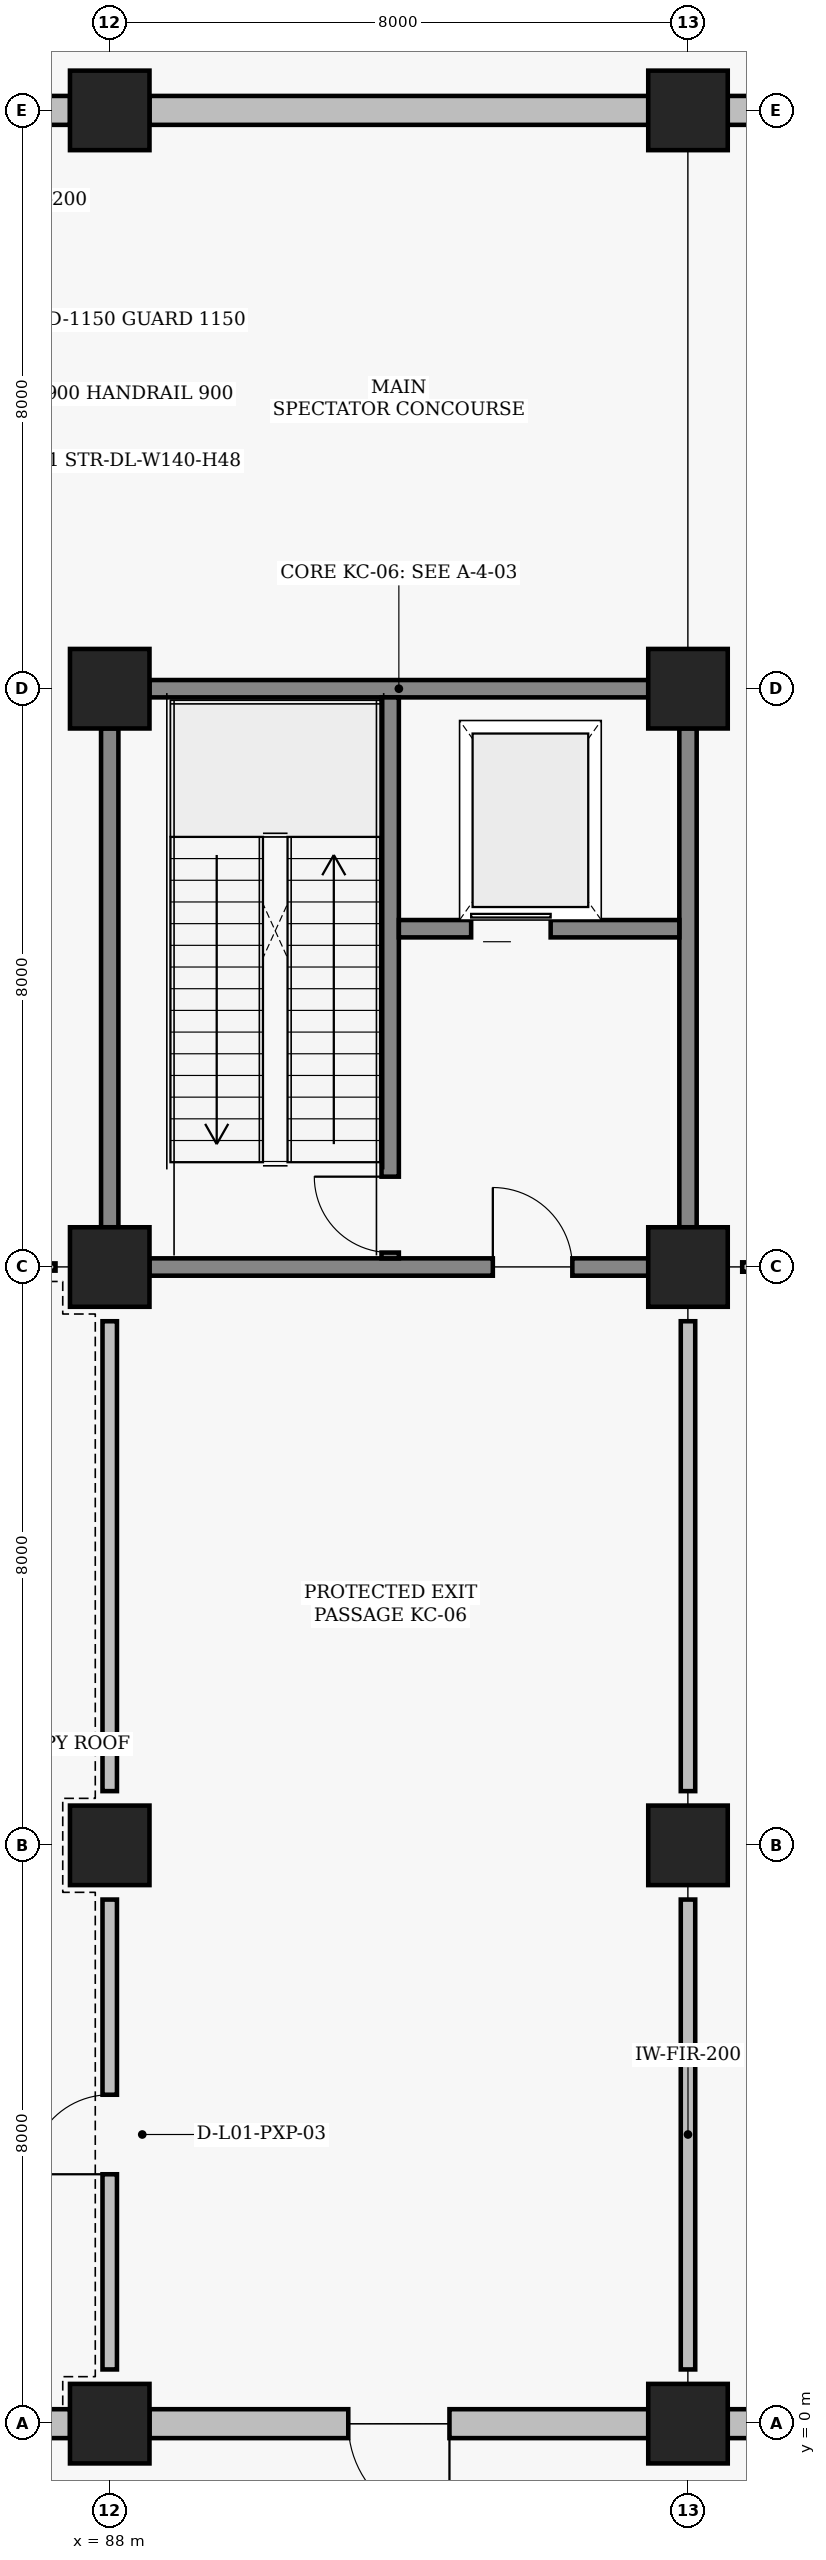
"""IFC4 building model, lengths in metres.
Left out: names, types, materials, properties, quantities, classifications, styles, units other than length and angle.
Written with IfcOpenShell. Run it as: python <this file> out.ifc"""

import sys

from ifc_helpers import new_model, si_unit, direction, frame, frame_2d, origin, origin_2d, place, context, subcontext, project, spatial, rectangle, extrude, element, fill, save


model = new_model("IFC4")
c1 = context("Model", 3, precision=1e-05, world=origin(), true_north=direction((0.0, 1.0)))
c2 = subcontext(c1, "Body", "Model", "MODEL_VIEW")
j1 = project(units=[si_unit("LENGTHUNIT", "METRE"), si_unit("PLANEANGLEUNIT", "RADIAN")], contexts=[c1])
p1 = place(None, origin())
s1 = spatial("IfcSite", under=j1, at=p1, CompositionType="ELEMENT")
p2 = place(p1, origin())
s2 = spatial("IfcBuilding", under=s1, at=p2, CompositionType="ELEMENT")
p3 = place(p2, origin())
s3 = spatial("IfcBuildingStorey", under=s2, at=p3, CompositionType="ELEMENT", Elevation=0.0)
for number, where, z_axis, x_axis in (
    (1, (88.0, 0.0, 0.0), (0.0, 0.0, 1.0), (1.0, 0.0, 0.0)),
    (2, (88.0, 8.0, 0.0), (0.0, 0.0, 1.0), (1.0, 0.0, 0.0)),
    (3, (88.0, 16.0, 0.0), (0.0, 0.0, 1.0), (1.0, 0.0, 0.0)),
    (4, (88.0, 24.0, 0.0), (0.0, 0.0, 1.0), (1.0, 0.0, 0.0)),
    (5, (88.0, 32.0, 0.0), (0.0, 0.0, 1.0), (1.0, 0.0, 0.0)),
    (6, (96.0, 0.0, 0.0), (0.0, 0.0, 1.0), (1.0, 0.0, 0.0)),
    (7, (96.0, 8.0, 0.0), (0.0, 0.0, 1.0), (1.0, 0.0, 0.0)),
    (8, (96.0, 16.0, 0.0), (0.0, 0.0, 1.0), (1.0, 0.0, 0.0)),
    (9, (96.0, 24.0, 0.0), (0.0, 0.0, 1.0), (1.0, 0.0, 0.0)),
    (10, (96.0, 32.0, 0.0), (0.0, 0.0, 1.0), (1.0, 0.0, 0.0)),
):
    element("IfcColumn", number, at=place(p3, frame(where, z_axis=z_axis, x_axis=x_axis)), inside=s3, PredefinedType="COLUMN", context=c2, shape_type="SweptSolid", body=[
        extrude(rectangle(XDim=1.1, YDim=1.1, at=origin_2d()), origin(), (0.0, 0.0, 1.0), 4.8),
    ])
p4 = place(p3, frame((80.55, 0.0, 0.0), z_axis=(0.0, 0.0, 1.0), x_axis=(1.0, 0.0, 0.0)))
e11 = element("IfcWall", 11, at=p4, inside=s3, PredefinedType="SOLIDWALL", context=c2, shape_type="SweptSolid", body=[
    extrude(rectangle(XDim=6.9, YDim=0.4, at=frame_2d((3.45, 0.0))), origin(), (0.0, 0.0, 1.0), 3.81),
])
p5 = place(p4, frame((1.85, 0.0, 0.0)))
e12 = element("IfcOpeningElement", 12, at=p5, cuts=e11, PredefinedType="OPENING", context=c2, shape_type="SweptSolid", body=[
    extrude(rectangle(XDim=3.2, YDim=2.7, at=frame_2d((1.6, 1.35))), frame((0.0, 0.21, 0.0), z_axis=(0.0, -1.0, 0.0), x_axis=(1.0, 0.0, 0.0)), (0.0, 0.0, 1.0), 0.42),
])
p6 = place(p3, frame((80.55, 32.0, 0.0), z_axis=(0.0, 0.0, 1.0), x_axis=(1.0, 0.0, 0.0)))
e13 = element("IfcWall", 13, at=p6, inside=s3, PredefinedType="SOLIDWALL", context=c2, shape_type="SweptSolid", body=[
    extrude(rectangle(XDim=6.9, YDim=0.4, at=frame_2d((3.45, 0.0))), origin(), (0.0, 0.0, 1.0), 3.81),
])
p7 = place(p6, frame((2.25, 0.0, 0.95)))
e14 = element("IfcOpeningElement", 14, at=p7, cuts=e13, PredefinedType="OPENING", context=c2, shape_type="SweptSolid", body=[
    extrude(rectangle(XDim=2.4, YDim=2.0, at=frame_2d((1.2, 1.0))), frame((0.0, 0.21, 0.0), z_axis=(0.0, -1.0, 0.0), x_axis=(1.0, 0.0, 0.0)), (0.0, 0.0, 1.0), 0.42),
])
p8 = place(p3, frame((95.45, 0.0, 0.0), z_axis=(0.0, 0.0, 1.0), x_axis=(-1.0, 0.0, 0.0)))
e15 = element("IfcWall", 15, at=p8, inside=s3, PredefinedType="SOLIDWALL", context=c2, shape_type="SweptSolid", body=[
    extrude(rectangle(XDim=6.9, YDim=0.4, at=frame_2d((3.45, 0.0))), origin(), (0.0, 0.0, 1.0), 3.81),
])
p9 = place(p8, frame((2.75, 0.0, 0.0)))
e16 = element("IfcOpeningElement", 16, at=p9, cuts=e15, PredefinedType="OPENING", context=c2, shape_type="SweptSolid", body=[
    extrude(rectangle(XDim=1.4, YDim=2.2, at=frame_2d((0.7, 1.1))), frame((0.0, 0.21, 0.0), z_axis=(0.0, -1.0, 0.0), x_axis=(1.0, 0.0, 0.0)), (0.0, 0.0, 1.0), 0.42),
])
p10 = place(p3, frame((88.55, 32.0, 0.0), z_axis=(0.0, 0.0, 1.0), x_axis=(1.0, 0.0, 0.0)))
e17 = element("IfcWall", 17, at=p10, inside=s3, PredefinedType="SOLIDWALL", context=c2, shape_type="SweptSolid", body=[
    extrude(rectangle(XDim=6.9, YDim=0.4, at=frame_2d((3.45, 0.0))), origin(), (0.0, 0.0, 1.0), 3.81),
])
p11 = place(p3, frame((96.55, 0.0, 0.0), z_axis=(0.0, 0.0, 1.0), x_axis=(1.0, 0.0, 0.0)))
e18 = element("IfcWall", 18, at=p11, inside=s3, PredefinedType="SOLIDWALL", context=c2, shape_type="SweptSolid", body=[
    extrude(rectangle(XDim=6.9, YDim=0.4, at=frame_2d((3.45, 0.0))), origin(), (0.0, 0.0, 1.0), 3.81),
])
p12 = place(p11, frame((1.55, 0.0, 0.0)))
e19 = element("IfcOpeningElement", 19, at=p12, cuts=e18, PredefinedType="OPENING", context=c2, shape_type="SweptSolid", body=[
    extrude(rectangle(XDim=3.8, YDim=3.4, at=frame_2d((1.9, 1.7))), frame((0.0, 0.21, 0.0), z_axis=(0.0, -1.0, 0.0), x_axis=(1.0, 0.0, 0.0)), (0.0, 0.0, 1.0), 0.42),
])
p13 = place(p3, frame((96.55, 32.0, 0.0), z_axis=(0.0, 0.0, 1.0), x_axis=(1.0, 0.0, 0.0)))
e20 = element("IfcWall", 20, at=p13, inside=s3, PredefinedType="SOLIDWALL", context=c2, shape_type="SweptSolid", body=[
    extrude(rectangle(XDim=6.9, YDim=0.4, at=frame_2d((3.45, 0.0))), origin(), (0.0, 0.0, 1.0), 3.81),
])
p14 = place(p13, frame((2.15, 0.0, 0.0)))
e21 = element("IfcOpeningElement", 21, at=p14, cuts=e20, PredefinedType="OPENING", context=c2, shape_type="SweptSolid", body=[
    extrude(rectangle(XDim=2.6, YDim=2.5, at=frame_2d((1.3, 1.25))), frame((0.0, 0.21, 0.0), z_axis=(0.0, -1.0, 0.0), x_axis=(1.0, 0.0, 0.0)), (0.0, 0.0, 1.0), 0.42),
])
p15 = place(p3, frame((88.55, 16.0, 0.0), z_axis=(0.0, 0.0, 1.0), x_axis=(1.0, 0.0, 0.0)))
e22 = element("IfcWall", 22, at=p15, inside=s3, PredefinedType="SHEAR", context=c2, shape_type="SweptSolid", body=[
    extrude(rectangle(XDim=6.9, YDim=0.24, at=frame_2d((3.45, 0.0))), origin(), (0.0, 0.0, 1.0), 2.34),
])
p16 = place(p15, frame((4.75, 0.0, 0.0)))
e23 = element("IfcOpeningElement", 23, at=p16, cuts=e22, PredefinedType="OPENING", context=c2, shape_type="SweptSolid", body=[
    extrude(rectangle(XDim=1.1, YDim=2.2, at=frame_2d((0.55, 1.1))), frame((0.0, 0.13, 0.0), z_axis=(0.0, -1.0, 0.0), x_axis=(1.0, 0.0, 0.0)), (0.0, 0.0, 1.0), 0.26),
])
p17 = place(p3, frame((88.55, 24.0, 0.0), z_axis=(0.0, 0.0, 1.0), x_axis=(1.0, 0.0, 0.0)))
e24 = element("IfcWall", 24, at=p17, inside=s3, PredefinedType="SHEAR", context=c2, shape_type="SweptSolid", body=[
    extrude(rectangle(XDim=6.9, YDim=0.24, at=frame_2d((3.45, 0.0))), origin(), (0.0, 0.0, 1.0), 3.66),
])
p18 = place(p3, frame((88.0, 16.55, 0.0), z_axis=(0.0, 0.0, 1.0), x_axis=(0.0, 1.0, 0.0)))
e25 = element("IfcWall", 25, at=p18, inside=s3, PredefinedType="SHEAR", context=c2, shape_type="SweptSolid", body=[
    extrude(rectangle(XDim=6.9, YDim=0.24, at=frame_2d((3.45, 0.0))), origin(), (0.0, 0.0, 1.0), 2.34),
])
p19 = place(p3, frame((96.0, 16.55, 0.0), z_axis=(0.0, 0.0, 1.0), x_axis=(0.0, 1.0, 0.0)))
e26 = element("IfcWall", 26, at=p19, inside=s3, PredefinedType="SHEAR", context=c2, shape_type="SweptSolid", body=[
    extrude(rectangle(XDim=6.9, YDim=0.24, at=frame_2d((3.45, 0.0))), origin(), (0.0, 0.0, 1.0), 3.66),
])
p20 = place(p3, frame((91.88, 16.12, 0.0), z_axis=(0.0, 0.0, 1.0), x_axis=(0.0, 1.0, 0.0)))
e27 = element("IfcWall", 27, at=p20, inside=s3, PredefinedType="SHEAR", context=c2, shape_type="SweptSolid", body=[
    extrude(rectangle(XDim=7.76, YDim=0.24, at=frame_2d((3.88, 0.0))), origin(), (0.0, 0.0, 1.0), 4.01),
])
p21 = place(p20, frame((0.08, 0.0, 0.0)))
e28 = element("IfcOpeningElement", 28, at=p21, cuts=e27, PredefinedType="OPENING", context=c2, shape_type="SweptSolid", body=[
    extrude(rectangle(XDim=1.05, YDim=2.15, at=frame_2d((0.525, 1.075))), frame((0.0, 0.13, 0.0), z_axis=(0.0, -1.0, 0.0), x_axis=(1.0, 0.0, 0.0)), (0.0, 0.0, 1.0), 0.26),
])
p22 = place(p3, frame((92.0, 20.68, 0.0), z_axis=(0.0, 0.0, 1.0), x_axis=(1.0, 0.0, 0.0)))
e29 = element("IfcWall", 29, at=p22, inside=s3, PredefinedType="SHEAR", context=c2, shape_type="SweptSolid", body=[
    extrude(rectangle(XDim=3.88, YDim=0.24, at=frame_2d((1.94, 0.0))), origin(), (0.0, 0.0, 1.0), 3.81),
])
p23 = place(p22, frame((1.0, 0.0, 0.0)))
e30 = element("IfcOpeningElement", 30, at=p23, cuts=e29, PredefinedType="OPENING", context=c2, shape_type="SweptSolid", body=[
    extrude(rectangle(XDim=1.1, YDim=2.15, at=frame_2d((0.55, 1.075))), frame((0.0, 0.13, 0.0), z_axis=(0.0, -1.0, 0.0), x_axis=(1.0, 0.0, 0.0)), (0.0, 0.0, 1.0), 0.26),
])
p24 = place(p3, frame((88.0, 0.75, 0.0), z_axis=(0.0, 0.0, 1.0), x_axis=(0.0, 1.0, 0.0)))
e31 = element("IfcWall", 31, at=p24, inside=s3, PredefinedType="PARTITIONING", context=c2, shape_type="SweptSolid", body=[
    extrude(rectangle(XDim=6.5, YDim=0.2, at=frame_2d((3.25, 0.0))), origin(), (0.0, 0.0, 1.0), 3.81),
])
p25 = place(p24, frame((2.7, 0.0, 0.0)))
e32 = element("IfcOpeningElement", 32, at=p25, cuts=e31, PredefinedType="OPENING", context=c2, shape_type="SweptSolid", body=[
    extrude(rectangle(XDim=1.1, YDim=2.2, at=frame_2d((0.55, 1.1))), frame((0.0, 0.11, 0.0), z_axis=(0.0, -1.0, 0.0), x_axis=(1.0, 0.0, 0.0)), (0.0, 0.0, 1.0), 0.22),
])
for number, where, z_axis, x_axis in (
    (33, (96.0, 0.75, 0.0), (0.0, 0.0, 1.0), (0.0, 1.0, 0.0)),
    (34, (88.0, 8.75, 0.0), (0.0, 0.0, 1.0), (0.0, 1.0, 0.0)),
    (35, (96.0, 8.75, 0.0), (0.0, 0.0, 1.0), (0.0, 1.0, 0.0)),
):
    element("IfcWall", number, at=place(p3, frame(where, z_axis=z_axis, x_axis=x_axis)), inside=s3, PredefinedType="PARTITIONING", context=c2, shape_type="SweptSolid", body=[
        extrude(rectangle(XDim=6.5, YDim=0.2, at=frame_2d((3.25, 0.0))), origin(), (0.0, 0.0, 1.0), 3.81),
    ])
p26 = place(p3, frame((80.75, 16.0, 0.0), z_axis=(0.0, 0.0, 1.0), x_axis=(1.0, 0.0, 0.0)))
e36 = element("IfcWall", 36, at=p26, inside=s3, PredefinedType="PARTITIONING", context=c2, shape_type="SweptSolid", body=[
    extrude(rectangle(XDim=6.5, YDim=0.1, at=frame_2d((3.25, 0.0))), origin(), (0.0, 0.0, 1.0), 2.34),
])
p27 = place(p26, frame((2.775, 0.0, 0.0)))
e37 = element("IfcOpeningElement", 37, at=p27, cuts=e36, PredefinedType="OPENING", context=c2, shape_type="SweptSolid", body=[
    extrude(rectangle(XDim=0.95, YDim=2.1, at=frame_2d((0.475, 1.05))), frame((0.0, 0.06, 0.0), z_axis=(0.0, -1.0, 0.0), x_axis=(1.0, 0.0, 0.0)), (0.0, 0.0, 1.0), 0.12),
])
p28 = place(p3, frame((96.75, 16.0, 0.0), z_axis=(0.0, 0.0, 1.0), x_axis=(1.0, 0.0, 0.0)))
e38 = element("IfcWall", 38, at=p28, inside=s3, PredefinedType="PARTITIONING", context=c2, shape_type="SweptSolid", body=[
    extrude(rectangle(XDim=6.5, YDim=0.13, at=frame_2d((3.25, 0.0))), origin(), (0.0, 0.0, 1.0), 3.91),
])
p29 = place(p28, frame((2.75, 0.0, 0.0)))
e39 = element("IfcOpeningElement", 39, at=p29, cuts=e38, PredefinedType="OPENING", context=c2, shape_type="SweptSolid", body=[
    extrude(rectangle(XDim=1.0, YDim=2.1, at=frame_2d((0.5, 1.05))), frame((0.0, 0.075, 0.0), z_axis=(0.0, -1.0, 0.0), x_axis=(1.0, 0.0, 0.0)), (0.0, 0.0, 1.0), 0.15),
])
p30 = place(p9, origin())
e40 = element("IfcDoor", 40, at=p30, inside=s3, OperationType="SINGLE_SWING_LEFT", PredefinedType="DOOR", context=c2, shape_type="SweptSolid", body=[
    extrude(rectangle(XDim=1.4, YDim=2.2, at=frame_2d((0.7, 1.1))), frame((0.0, 0.025, 0.0), z_axis=(0.0, -1.0, 0.0), x_axis=(1.0, 0.0, 0.0)), (0.0, 0.0, 1.0), 0.05),
])
fill(e16, e40)
p31 = place(p16, origin())
e41 = element("IfcDoor", 41, at=p31, inside=s3, OperationType="SINGLE_SWING_LEFT", PredefinedType="DOOR", context=c2, shape_type="SweptSolid", body=[
    extrude(rectangle(XDim=1.1, YDim=2.2, at=frame_2d((0.55, 1.1))), frame((0.0, 0.025, 0.0), z_axis=(0.0, -1.0, 0.0), x_axis=(1.0, 0.0, 0.0)), (0.0, 0.0, 1.0), 0.05),
])
fill(e23, e41)
p32 = place(p21, origin())
e42 = element("IfcDoor", 42, at=p32, inside=s3, OperationType="SINGLE_SWING_RIGHT", PredefinedType="DOOR", context=c2, shape_type="SweptSolid", body=[
    extrude(rectangle(XDim=1.05, YDim=2.15, at=frame_2d((0.525, 1.075))), frame((0.0, 0.025, 0.0), z_axis=(0.0, -1.0, 0.0), x_axis=(1.0, 0.0, 0.0)), (0.0, 0.0, 1.0), 0.05),
])
fill(e28, e42)
p33 = place(p23, origin())
e43 = element("IfcDoor", 43, at=p33, inside=s3, OperationType="SLIDING_TO_LEFT", PredefinedType="DOOR", context=c2, shape_type="SweptSolid", body=[
    extrude(rectangle(XDim=1.1, YDim=2.15, at=frame_2d((0.55, 1.075))), frame((0.0, 0.025, 0.0), z_axis=(0.0, -1.0, 0.0), x_axis=(1.0, 0.0, 0.0)), (0.0, 0.0, 1.0), 0.05),
])
fill(e30, e43)
p34 = place(p25, origin())
e44 = element("IfcDoor", 44, at=p34, inside=s3, OperationType="SINGLE_SWING_LEFT", PredefinedType="DOOR", context=c2, shape_type="SweptSolid", body=[
    extrude(rectangle(XDim=1.1, YDim=2.2, at=frame_2d((0.55, 1.1))), frame((0.0, 0.025, 0.0), z_axis=(0.0, -1.0, 0.0), x_axis=(1.0, 0.0, 0.0)), (0.0, 0.0, 1.0), 0.05),
])
fill(e32, e44)
save(model, sys.argv[1])
